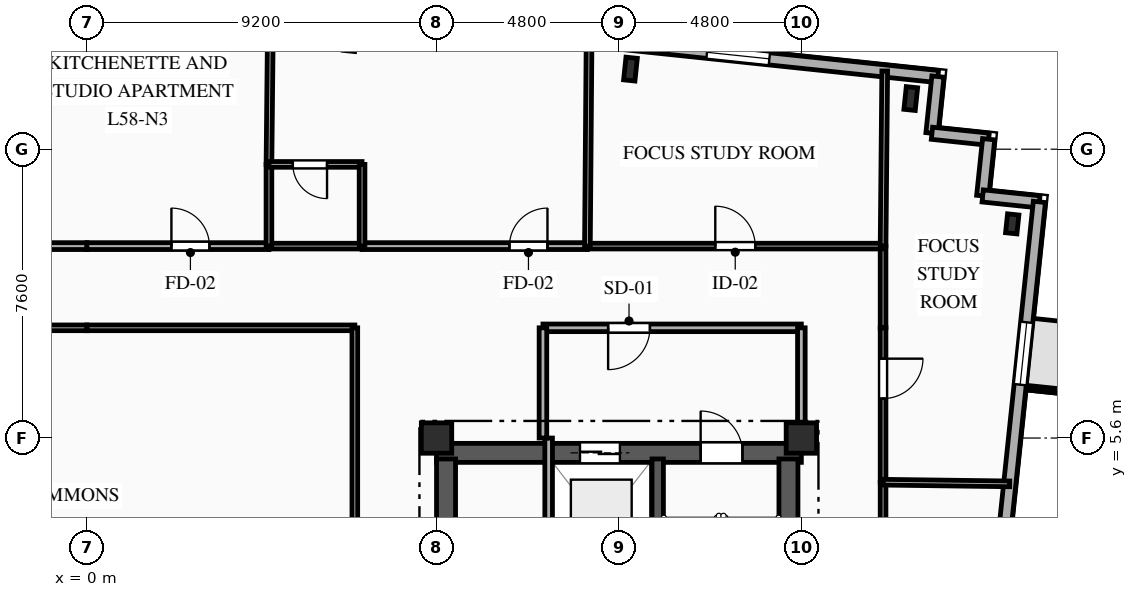
"""IFC4 building model, lengths in metres.
Left out: names, types, materials, properties, quantities, classifications, styles, units other than length and angle.
Written with IfcOpenShell. Run it as: python <this file> out.ifc"""

import sys

from ifc_helpers import new_model, si_unit, direction, frame, frame_2d, origin, origin_2d, place, context, subcontext, project, spatial, rectangle, i_section, extrude, element, fill, save


model = new_model("IFC4")
c1 = context("Model", 3, precision=1e-05, world=origin(), true_north=direction((0.0, 1.0)))
c2 = subcontext(c1, "Body", "Model", "MODEL_VIEW")
j1 = project(units=[si_unit("LENGTHUNIT", "METRE"), si_unit("PLANEANGLEUNIT", "RADIAN")], contexts=[c1])
p1 = place(None, origin())
s1 = spatial("IfcSite", under=j1, at=p1, CompositionType="ELEMENT")
p2 = place(p1, origin())
s2 = spatial("IfcBuilding", under=s1, at=p2, CompositionType="ELEMENT")
p3 = place(p2, frame((0.0, 0.0, 206.45)))
s3 = spatial("IfcBuildingStorey", under=s2, at=p3, CompositionType="ELEMENT", Elevation=206.45)
for number, where, z_axis, x_axis in (
    (1, (9.2, 5.6, 0.0), (0.0, 0.0, 1.0), (1.0, 0.0, 0.0)),
    (2, (18.8, 5.6, 0.0), (0.0, 0.0, 1.0), (1.0, 0.0, 0.0)),
):
    element("IfcColumn", number, at=place(p3, frame(where, z_axis=z_axis, x_axis=x_axis)), inside=s3, PredefinedType="COLUMN", context=c2, shape_type="SweptSolid", body=[
        extrude(rectangle(XDim=0.8, YDim=0.8, at=origin_2d()), origin(), (0.0, 0.0, 1.0), 3.35),
    ])
for number, where, z_axis, x_axis in (
    (3, (21.679, 14.532, 0.0), (0.0, 0.0, 1.0), (0.995, -0.105, 0.0)),
    (4, (14.303, 15.308, 0.0), (0.0, 0.0, 1.0), (0.995, -0.105, 0.0)),
):
    element("IfcColumn", number, at=place(p3, frame(where, z_axis=z_axis, x_axis=x_axis)), inside=s3, PredefinedType="COLUMN", context=c2, shape_type="SweptSolid", body=[
        extrude(i_section(OverallWidth=0.3, OverallDepth=0.6, WebThickness=0.015, FlangeThickness=0.03, FilletRadius=0.027, at=origin_2d()), origin(), (0.0, 0.0, 1.0), 3.35),
    ])
p4 = place(p3, frame((24.349, 11.235, 0.0), z_axis=(0.0, 0.0, 1.0), x_axis=(0.994521895368, -0.104528463268, 0.0)))
e5 = element("IfcColumn", 5, at=p4, inside=s3, PredefinedType="COLUMN", context=c2, shape_type="SweptSolid", body=[
    extrude(i_section(OverallWidth=0.3, OverallDepth=0.5, WebThickness=0.014, FlangeThickness=0.028, FilletRadius=0.027, at=origin_2d()), origin(), (0.0, 0.0, 1.0), 3.35),
])
p5 = place(p3, frame((-23.156, 19.898, 0.0), z_axis=(0.0, 0.0, 1.0), x_axis=(0.994522001802, -0.104527450613, 0.0)))
e6 = element("IfcWall", 6, at=p5, inside=s3, PredefinedType="SOLIDWALL", context=c2, shape_type="SweptSolid", body=[
    extrude(rectangle(XDim=45.8, YDim=0.32, at=frame_2d((22.9, 0.0))), origin(), (0.0, 0.0, 1.0), 3.04),
])
p6 = place(p5, frame((6.021, 0.0, 0.85)))
e7 = element("IfcOpeningElement", 7, at=p6, cuts=e6, PredefinedType="OPENING", context=c2, shape_type="SweptSolid", body=[
    extrude(rectangle(XDim=1.65, YDim=1.85, at=frame_2d((0.825, 0.925))), frame((0.0, 0.17, 0.0), z_axis=(0.0, -1.0, 0.0), x_axis=(1.0, 0.0, 0.0)), (0.0, 0.0, 1.0), 0.34),
])
p7 = place(p5, frame((15.985, 0.0, 0.85)))
e8 = element("IfcOpeningElement", 8, at=p7, cuts=e6, PredefinedType="OPENING", context=c2, shape_type="SweptSolid", body=[
    extrude(rectangle(XDim=1.5, YDim=1.85, at=frame_2d((0.75, 0.925))), frame((0.0, 0.17, 0.0), z_axis=(0.0, -1.0, 0.0), x_axis=(1.0, 0.0, 0.0)), (0.0, 0.0, 1.0), 0.34),
])
p8 = place(p5, frame((22.881, 0.0, 0.85)))
e9 = element("IfcOpeningElement", 9, at=p8, cuts=e6, PredefinedType="OPENING", context=c2, shape_type="SweptSolid", body=[
    extrude(rectangle(XDim=2.2, YDim=1.85, at=frame_2d((1.1, 0.925))), frame((0.0, 0.17, 0.0), z_axis=(0.0, -1.0, 0.0), x_axis=(1.0, 0.0, 0.0)), (0.0, 0.0, 1.0), 0.34),
])
p9 = place(p5, frame((31.288, 0.0, 0.85)))
e10 = element("IfcOpeningElement", 10, at=p9, cuts=e6, PredefinedType="OPENING", context=c2, shape_type="SweptSolid", body=[
    extrude(rectangle(XDim=2.2, YDim=1.85, at=frame_2d((1.1, 0.925))), frame((0.0, 0.17, 0.0), z_axis=(0.0, -1.0, 0.0), x_axis=(1.0, 0.0, 0.0)), (0.0, 0.0, 1.0), 0.34),
])
p10 = place(p5, frame((39.69, 0.0, 0.85)))
e11 = element("IfcOpeningElement", 11, at=p10, cuts=e6, PredefinedType="OPENING", context=c2, shape_type="SweptSolid", body=[
    extrude(rectangle(XDim=1.65, YDim=1.85, at=frame_2d((0.825, 0.925))), frame((0.0, 0.17, 0.0), z_axis=(0.0, -1.0, 0.0), x_axis=(1.0, 0.0, 0.0)), (0.0, 0.0, 1.0), 0.34),
])
p11 = place(p3, frame((22.393, 15.111, 0.0), z_axis=(0.0, 0.0, 1.0), x_axis=(-0.104481464157, -0.994526834051, 0.0)))
e12 = element("IfcWall", 12, at=p11, inside=s3, PredefinedType="SOLIDWALL", context=c2, shape_type="SweptSolid", body=[
    extrude(rectangle(XDim=1.5, YDim=0.32, at=frame_2d((0.75, 0.0))), origin(), (0.0, 0.0, 1.0), 3.04),
])
for number, where, z_axis, x_axis in (
    (13, (22.237, 13.619, 0.0), (0.0, 0.0, 1.0), (0.995, -0.104, 0.0)),
    (14, (23.728, 13.462, 0.0), (0.0, 0.0, 1.0), (-0.104, -0.995, 0.0)),
    (15, (23.572, 11.971, 0.0), (0.0, 0.0, 1.0), (0.995, -0.105, 0.0)),
):
    element("IfcWall", number, at=place(p3, frame(where, z_axis=z_axis, x_axis=x_axis)), inside=s3, PredefinedType="SOLIDWALL", context=c2, shape_type="SweptSolid", body=[
        extrude(rectangle(XDim=1.5, YDim=0.32, at=frame_2d((0.75, 0.0))), origin(), (0.0, 0.0, 1.0), 3.04),
    ])
p12 = place(p3, frame((25.063, 11.814, 0.0), z_axis=(0.0, 0.0, 1.0), x_axis=(-0.104523275986, -0.99452244056, 0.0)))
e16 = element("IfcWall", 16, at=p12, inside=s3, PredefinedType="SOLIDWALL", context=c2, shape_type="SweptSolid", body=[
    extrude(rectangle(XDim=28.8, YDim=0.32, at=frame_2d((14.4, 0.0))), origin(), (0.0, 0.0, 1.0), 3.04),
])
p13 = place(p12, frame((3.186, 0.0, 0.85)))
e17 = element("IfcOpeningElement", 17, at=p13, cuts=e16, PredefinedType="OPENING", context=c2, shape_type="SweptSolid", body=[
    extrude(rectangle(XDim=1.65, YDim=1.85, at=frame_2d((0.825, 0.925))), frame((0.0, 0.17, 0.0), z_axis=(0.0, -1.0, 0.0), x_axis=(1.0, 0.0, 0.0)), (0.0, 0.0, 1.0), 0.34),
])
p14 = place(p12, frame((11.93, 0.0, 0.85)))
e18 = element("IfcOpeningElement", 18, at=p14, cuts=e16, PredefinedType="OPENING", context=c2, shape_type="SweptSolid", body=[
    extrude(rectangle(XDim=1.65, YDim=1.85, at=frame_2d((0.825, 0.925))), frame((0.0, 0.17, 0.0), z_axis=(0.0, -1.0, 0.0), x_axis=(1.0, 0.0, 0.0)), (0.0, 0.0, 1.0), 0.34),
])
p15 = place(p12, frame((22.359, 0.0, 0.85)))
e19 = element("IfcOpeningElement", 19, at=p15, cuts=e16, PredefinedType="OPENING", context=c2, shape_type="SweptSolid", body=[
    extrude(rectangle(XDim=1.65, YDim=1.85, at=frame_2d((0.825, 0.925))), frame((0.0, 0.17, 0.0), z_axis=(0.0, -1.0, 0.0), x_axis=(1.0, 0.0, 0.0)), (0.0, 0.0, 1.0), 0.34),
])
p16 = place(p3, frame((9.2, 5.21, 0.0), z_axis=(0.0, 0.0, 1.0), x_axis=(1.0, 0.0, 0.0)))
e20 = element("IfcWall", 20, at=p16, inside=s3, PredefinedType="SHEAR", context=c2, shape_type="SweptSolid", body=[
    extrude(rectangle(XDim=9.6, YDim=0.5, at=frame_2d((4.8, 0.0))), origin(), (0.0, 0.0, 1.0), 3.04),
])
p17 = place(p16, frame((6.95, 0.0, 0.0)))
e21 = element("IfcOpeningElement", 21, at=p17, cuts=e20, PredefinedType="OPENING", context=c2, shape_type="SweptSolid", body=[
    extrude(rectangle(XDim=1.1, YDim=2.15, at=frame_2d((0.55, 1.075))), frame((0.0, 0.26, 0.0), z_axis=(0.0, -1.0, 0.0), x_axis=(1.0, 0.0, 0.0)), (0.0, 0.0, 1.0), 0.52),
])
p18 = place(p16, frame((3.775, 0.0, 0.0)))
e22 = element("IfcOpeningElement", 22, at=p18, cuts=e20, PredefinedType="OPENING", context=c2, shape_type="SweptSolid", body=[
    extrude(rectangle(XDim=1.05, YDim=2.1, at=frame_2d((0.525, 1.05))), frame((0.0, 0.26, 0.0), z_axis=(0.0, -1.0, 0.0), x_axis=(1.0, 0.0, 0.0)), (0.0, 0.0, 1.0), 0.52),
])
p19 = place(p3, frame((9.45, -5.05, 0.0), z_axis=(0.0, 0.0, 1.0), x_axis=(0.0, 1.0, 0.0)))
e23 = element("IfcWall", 23, at=p19, inside=s3, PredefinedType="SHEAR", context=c2, shape_type="SweptSolid", body=[
    extrude(rectangle(XDim=10.1, YDim=0.5, at=frame_2d((5.05, 0.0))), origin(), (0.0, 0.0, 1.0), 3.04),
])
p20 = place(p19, frame((7.15, 0.0, 0.0)))
e24 = element("IfcOpeningElement", 24, at=p20, cuts=e23, PredefinedType="OPENING", context=c2, shape_type="SweptSolid", body=[
    extrude(rectangle(XDim=0.9, YDim=2.1, at=frame_2d((0.45, 1.05))), frame((0.0, 0.26, 0.0), z_axis=(0.0, -1.0, 0.0), x_axis=(1.0, 0.0, 0.0)), (0.0, 0.0, 1.0), 0.52),
])
p21 = place(p19, frame((2.4, 0.0, 0.0)))
e25 = element("IfcOpeningElement", 25, at=p21, cuts=e23, PredefinedType="OPENING", context=c2, shape_type="SweptSolid", body=[
    extrude(rectangle(XDim=1.2, YDim=2.15, at=frame_2d((0.6, 1.075))), frame((0.0, 0.26, 0.0), z_axis=(0.0, -1.0, 0.0), x_axis=(1.0, 0.0, 0.0)), (0.0, 0.0, 1.0), 0.52),
])
p22 = place(p3, frame((18.46, -5.05, 0.0), z_axis=(0.0, 0.0, 1.0), x_axis=(0.0, 1.0, 0.0)))
e26 = element("IfcWall", 26, at=p22, inside=s3, PredefinedType="SHEAR", context=c2, shape_type="SweptSolid", body=[
    extrude(rectangle(XDim=10.1, YDim=0.5, at=frame_2d((5.05, 0.0))), origin(), (0.0, 0.0, 1.0), 3.04),
])
p23 = place(p3, frame((15.02, -5.05, 0.0), z_axis=(0.0, 0.0, 1.0), x_axis=(0.0, 1.0, 0.0)))
e27 = element("IfcWall", 27, at=p23, inside=s3, PredefinedType="SHEAR", context=c2, shape_type="SweptSolid", body=[
    extrude(rectangle(XDim=10.1, YDim=0.3, at=frame_2d((5.05, 0.0))), origin(), (0.0, 0.0, 1.0), 3.04),
])
p24 = place(p3, frame((12.15, 5.6, 0.0), z_axis=(0.0, 0.0, 1.0), x_axis=(0.0, -1.0, 0.0)))
e28 = element("IfcWall", 28, at=p24, inside=s3, PredefinedType="PARTITIONING", context=c2, shape_type="SweptSolid", body=[
    extrude(rectangle(XDim=4.05, YDim=0.2, at=frame_2d((2.025, 0.0))), origin(), (0.0, 0.0, 1.0), 3.04),
])
p25 = place(p3, frame((18.8, 8.5, 0.0), z_axis=(0.0, 0.0, 1.0), x_axis=(-1.0, 0.0, 0.0)))
e29 = element("IfcWall", 29, at=p25, inside=s3, PredefinedType="PARTITIONING", context=c2, shape_type="SweptSolid", body=[
    extrude(rectangle(XDim=6.8, YDim=0.2, at=frame_2d((3.4, 0.0))), origin(), (0.0, 0.0, 1.0), 3.04),
])
p26 = place(p25, frame((3.985, 0.0, 0.0)))
e30 = element("IfcOpeningElement", 30, at=p26, cuts=e29, PredefinedType="OPENING", context=c2, shape_type="SweptSolid", body=[
    extrude(rectangle(XDim=1.1, YDim=2.15, at=frame_2d((0.55, 1.075))), frame((0.0, 0.11, 0.0), z_axis=(0.0, -1.0, 0.0), x_axis=(1.0, 0.0, 0.0)), (0.0, 0.0, 1.0), 0.22),
])
p27 = place(p3, frame((18.8, 5.6, 0.0), z_axis=(0.0, 0.0, 1.0), x_axis=(0.0, 1.0, 0.0)))
e31 = element("IfcWall", 31, at=p27, inside=s3, PredefinedType="PARTITIONING", context=c2, shape_type="SweptSolid", body=[
    extrude(rectangle(XDim=2.9, YDim=0.2, at=frame_2d((1.45, 0.0))), origin(), (0.0, 0.0, 1.0), 2.665),
])
p28 = place(p3, frame((12.0, 8.5, 0.0), z_axis=(0.0, 0.0, 1.0), x_axis=(0.0, -1.0, 0.0)))
e32 = element("IfcWall", 32, at=p28, inside=s3, PredefinedType="PARTITIONING", context=c2, shape_type="SweptSolid", body=[
    extrude(rectangle(XDim=2.9, YDim=0.2, at=frame_2d((1.45, 0.0))), origin(), (0.0, 0.0, 1.0), 3.04),
])
p29 = place(p3, frame((-1.14, 10.65, 0.0), z_axis=(0.0, 0.0, 1.0), x_axis=(1.0, 0.0, 0.0)))
e33 = element("IfcWall", 33, at=p29, inside=s3, PredefinedType="PARTITIONING", context=c2, shape_type="SweptSolid", body=[
    extrude(rectangle(XDim=1.14, YDim=0.18, at=frame_2d((0.57, 0.0))), origin(), (0.0, 0.0, 1.0), 3.04),
])
p30 = place(p3, frame((0.0, 8.5, 0.0), z_axis=(0.0, 0.0, 1.0), x_axis=(-1.0, 0.0, 0.0)))
e34 = element("IfcWall", 34, at=p30, inside=s3, PredefinedType="PARTITIONING", context=c2, shape_type="SweptSolid", body=[
    extrude(rectangle(XDim=7.05, YDim=0.15, at=frame_2d((3.525, 0.0))), origin(), (0.0, 0.0, 1.0), 3.04),
])
p31 = place(p3, frame((20.95, 10.65, 0.0), z_axis=(0.0, 0.0, 1.0), x_axis=(0.0, -1.0, 0.0)))
e35 = element("IfcWall", 35, at=p31, inside=s3, PredefinedType="PARTITIONING", context=c2, shape_type="SweptSolid", body=[
    extrude(rectangle(XDim=2.15, YDim=0.15, at=frame_2d((1.075, 0.0))), origin(), (0.0, 0.0, 1.0), 3.04),
])
p32 = place(p3, frame((0.0, 10.65, 0.0), z_axis=(0.0, 0.0, 1.0), x_axis=(1.0, 0.0, 0.0)))
e36 = element("IfcWall", 36, at=p32, inside=s3, PredefinedType="PARTITIONING", context=c2, shape_type="SweptSolid", body=[
    extrude(rectangle(XDim=4.79, YDim=0.18, at=frame_2d((2.395, 0.0))), origin(), (0.0, 0.0, 1.0), 3.04),
])
p33 = place(p32, frame((2.224, 0.0, 0.0)))
e37 = element("IfcOpeningElement", 37, at=p33, cuts=e36, PredefinedType="OPENING", context=c2, shape_type="SweptSolid", body=[
    extrude(rectangle(XDim=1.0, YDim=2.15, at=frame_2d((0.5, 1.075))), frame((0.0, 0.1, 0.0), z_axis=(0.0, -1.0, 0.0), x_axis=(1.0, 0.0, 0.0)), (0.0, 0.0, 1.0), 0.2),
])
p34 = place(p3, frame((7.24, 10.65, 0.0), z_axis=(0.0, 0.0, 1.0), x_axis=(1.0, 0.0, 0.0)))
e38 = element("IfcWall", 38, at=p34, inside=s3, PredefinedType="PARTITIONING", context=c2, shape_type="SweptSolid", body=[
    extrude(rectangle(XDim=5.93, YDim=0.18, at=frame_2d((2.965, 0.0))), origin(), (0.0, 0.0, 1.0), 3.04),
])
p35 = place(p34, frame((3.879, 0.0, 0.0)))
e39 = element("IfcOpeningElement", 39, at=p35, cuts=e38, PredefinedType="OPENING", context=c2, shape_type="SweptSolid", body=[
    extrude(rectangle(XDim=1.0, YDim=2.15, at=frame_2d((0.5, 1.075))), frame((0.0, 0.1, 0.0), z_axis=(0.0, -1.0, 0.0), x_axis=(1.0, 0.0, 0.0)), (0.0, 0.0, 1.0), 0.2),
])
p36 = place(p3, frame((4.79, 10.65, 0.0), z_axis=(0.0, 0.0, 1.0), x_axis=(1.0, 0.0, 0.0)))
e40 = element("IfcWall", 40, at=p36, inside=s3, PredefinedType="PLUMBINGWALL", context=c2, shape_type="SweptSolid", body=[
    extrude(rectangle(XDim=2.45, YDim=0.15, at=frame_2d((1.225, 0.0))), origin(), (0.0, 0.0, 1.0), 3.04),
])
p37 = place(p3, frame((13.17, 10.65, 0.0), z_axis=(0.0, 0.0, 1.0), x_axis=(1.0, 0.0, 0.0)))
e41 = element("IfcWall", 41, at=p37, inside=s3, PredefinedType="PARTITIONING", context=c2, shape_type="SweptSolid", body=[
    extrude(rectangle(XDim=7.78, YDim=0.15, at=frame_2d((3.89, 0.0))), origin(), (0.0, 0.0, 1.0), 3.04),
])
p38 = place(p37, frame((3.365, 0.0, 0.0)))
e42 = element("IfcOpeningElement", 42, at=p38, cuts=e41, PredefinedType="OPENING", context=c2, shape_type="SweptSolid", body=[
    extrude(rectangle(XDim=1.05, YDim=2.15, at=frame_2d((0.525, 1.075))), frame((0.0, 0.085, 0.0), z_axis=(0.0, -1.0, 0.0), x_axis=(1.0, 0.0, 0.0)), (0.0, 0.0, 1.0), 0.17),
])
p39 = place(p3, frame((7.05, 8.5, 0.0), z_axis=(0.0, 0.0, 1.0), x_axis=(-1.0, 0.0, 0.0)))
e43 = element("IfcWall", 43, at=p39, inside=s3, PredefinedType="PARTITIONING", context=c2, shape_type="SweptSolid", body=[
    extrude(rectangle(XDim=7.05, YDim=0.15, at=frame_2d((3.525, 0.0))), origin(), (0.0, 0.0, 1.0), 3.04),
])
p40 = place(p3, frame((20.95, 4.438, 0.0), z_axis=(0.0, 0.0, 1.0), x_axis=(0.0, -1.0, 0.0)))
e44 = element("IfcWall", 44, at=p40, inside=s3, PredefinedType="PARTITIONING", context=c2, shape_type="SweptSolid", body=[
    extrude(rectangle(XDim=10.038, YDim=0.15, at=frame_2d((5.019, 0.0))), origin(), (0.0, 0.0, 1.0), 2.695),
])
p41 = place(p40, frame((5.472, 0.0, 0.0)))
e45 = element("IfcOpeningElement", 45, at=p41, cuts=e44, PredefinedType="OPENING", context=c2, shape_type="SweptSolid", body=[
    extrude(rectangle(XDim=1.05, YDim=2.15, at=frame_2d((0.525, 1.075))), frame((0.0, 0.085, 0.0), z_axis=(0.0, -1.0, 0.0), x_axis=(1.0, 0.0, 0.0)), (0.0, 0.0, 1.0), 0.17),
])
p42 = place(p3, frame((20.95, 8.5, 0.0), z_axis=(0.0, 0.0, 1.0), x_axis=(0.0, -1.0, 0.0)))
e46 = element("IfcWall", 46, at=p42, inside=s3, PredefinedType="PARTITIONING", context=c2, shape_type="SweptSolid", body=[
    extrude(rectangle(XDim=4.062, YDim=0.15, at=frame_2d((2.031, 0.0))), origin(), (0.0, 0.0, 1.0), 3.04),
])
p43 = place(p42, frame((0.812, 0.0, 0.0)))
e47 = element("IfcOpeningElement", 47, at=p43, cuts=e46, PredefinedType="OPENING", context=c2, shape_type="SweptSolid", body=[
    extrude(rectangle(XDim=1.05, YDim=2.15, at=frame_2d((0.525, 1.075))), frame((0.0, 0.085, 0.0), z_axis=(0.0, -1.0, 0.0), x_axis=(1.0, 0.0, 0.0)), (0.0, 0.0, 1.0), 0.17),
])
p44 = place(p3, frame((7.05, -0.8, 0.0), z_axis=(0.0, 0.0, 1.0), x_axis=(0.0, 1.0, 0.0)))
e48 = element("IfcWall", 48, at=p44, inside=s3, PredefinedType="PARTITIONING", context=c2, shape_type="SweptSolid", body=[
    extrude(rectangle(XDim=9.3, YDim=0.15, at=frame_2d((4.65, 0.0))), origin(), (0.0, 0.0, 1.0), 3.04),
])
p45 = place(p3, frame((20.95, 4.438, 0.0), z_axis=(0.0, 0.0, 1.0), x_axis=(0.999913116238, -0.013181804667, 0.0)))
e49 = element("IfcWall", 49, at=p45, inside=s3, PredefinedType="PARTITIONING", context=c2, shape_type="SweptSolid", body=[
    extrude(rectangle(XDim=3.334, YDim=0.15, at=frame_2d((1.667, 0.0))), origin(), (0.0, 0.0, 1.0), 3.04),
])
p46 = place(p3, frame((20.95, 10.65, 0.0), z_axis=(0.0, 0.0, 1.0), x_axis=(0.009535990233, 0.999954531411, 0.0)))
e50 = element("IfcWall", 50, at=p46, inside=s3, PredefinedType="PARTITIONING", context=c2, shape_type="SweptSolid", body=[
    extrude(rectangle(XDim=4.608, YDim=0.15, at=frame_2d((2.304, 0.0))), origin(), (0.0, 0.0, 1.0), 2.665),
])
p47 = place(p3, frame((4.834, 16.957, 0.0), z_axis=(0.0, 0.0, 1.0), x_axis=(-0.010572096358, -0.999944113828, 0.0)))
e51 = element("IfcWall", 51, at=p47, inside=s3, PredefinedType="PARTITIONING", context=c2, shape_type="SweptSolid", body=[
    extrude(rectangle(XDim=4.157, YDim=0.15, at=frame_2d((2.078, 0.0))), origin(), (0.0, 0.0, 1.0), 3.04),
])
p48 = place(p3, frame((4.79, 12.8, 0.0), z_axis=(0.0, 0.0, 1.0), x_axis=(0.0, -1.0, 0.0)))
e52 = element("IfcWall", 52, at=p48, inside=s3, PredefinedType="PLUMBINGWALL", context=c2, shape_type="SweptSolid", body=[
    extrude(rectangle(XDim=2.15, YDim=0.15, at=frame_2d((1.075, 0.0))), origin(), (0.0, 0.0, 1.0), 3.04),
])
p49 = place(p3, frame((7.24, 12.8, 0.0), z_axis=(0.0, 0.0, 1.0), x_axis=(-1.0, 0.0, 0.0)))
e53 = element("IfcWall", 53, at=p49, inside=s3, PredefinedType="PLUMBINGWALL", context=c2, shape_type="SweptSolid", body=[
    extrude(rectangle(XDim=2.45, YDim=0.15, at=frame_2d((1.225, 0.0))), origin(), (0.0, 0.0, 1.0), 3.04),
])
p50 = place(p49, frame((0.921, 0.0, 0.0)))
e54 = element("IfcOpeningElement", 54, at=p50, cuts=e53, PredefinedType="OPENING", context=c2, shape_type="SweptSolid", body=[
    extrude(rectangle(XDim=0.9, YDim=2.1, at=frame_2d((0.45, 1.05))), frame((0.0, 0.085, 0.0), z_axis=(0.0, -1.0, 0.0), x_axis=(1.0, 0.0, 0.0)), (0.0, 0.0, 1.0), 0.17),
])
p51 = place(p3, frame((7.24, 10.65, 0.0), z_axis=(0.0, 0.0, 1.0), x_axis=(0.0, 1.0, 0.0)))
e55 = element("IfcWall", 55, at=p51, inside=s3, PredefinedType="PLUMBINGWALL", context=c2, shape_type="SweptSolid", body=[
    extrude(rectangle(XDim=2.15, YDim=0.15, at=frame_2d((1.075, 0.0))), origin(), (0.0, 0.0, 1.0), 3.04),
])
p52 = place(p3, frame((13.214, 16.076, 0.0), z_axis=(0.0, 0.0, 1.0), x_axis=(-0.008099086408, -0.999967201862, 0.0)))
e56 = element("IfcWall", 56, at=p52, inside=s3, PredefinedType="PARTITIONING", context=c2, shape_type="SweptSolid", body=[
    extrude(rectangle(XDim=5.426, YDim=0.15, at=frame_2d((2.713, 0.0))), origin(), (0.0, 0.0, 1.0), 3.04),
])
p53 = place(p10, origin())
e57 = element("IfcWindow", 57, at=p53, inside=s3, PartitioningType="SINGLE_PANEL", PredefinedType="WINDOW", context=c2, shape_type="SweptSolid", body=[
    extrude(rectangle(XDim=1.65, YDim=1.85, at=frame_2d((0.825, 0.925))), frame((0.0, 0.03, 0.0), z_axis=(0.0, -1.0, 0.0), x_axis=(1.0, 0.0, 0.0)), (0.0, 0.0, 1.0), 0.06),
])
fill(e11, e57)
p54 = place(p13, origin())
e58 = element("IfcWindow", 58, at=p54, inside=s3, PartitioningType="SINGLE_PANEL", PredefinedType="WINDOW", context=c2, shape_type="SweptSolid", body=[
    extrude(rectangle(XDim=1.65, YDim=1.85, at=frame_2d((0.825, 0.925))), frame((0.0, 0.03, 0.0), z_axis=(0.0, -1.0, 0.0), x_axis=(1.0, 0.0, 0.0)), (0.0, 0.0, 1.0), 0.06),
])
fill(e17, e58)
p55 = place(p17, origin())
e59 = element("IfcDoor", 59, at=p55, inside=s3, OperationType="SINGLE_SWING_LEFT", PredefinedType="DOOR", context=c2, shape_type="SweptSolid", body=[
    extrude(rectangle(XDim=1.1, YDim=2.15, at=frame_2d((0.55, 1.075))), frame((0.0, 0.025, 0.0), z_axis=(0.0, -1.0, 0.0), x_axis=(1.0, 0.0, 0.0)), (0.0, 0.0, 1.0), 0.05),
])
fill(e21, e59)
p56 = place(p18, origin())
e60 = element("IfcDoor", 60, at=p56, inside=s3, OperationType="DOUBLE_DOOR_SLIDING", PredefinedType="DOOR", context=c2, shape_type="SweptSolid", body=[
    extrude(rectangle(XDim=1.05, YDim=2.1, at=frame_2d((0.525, 1.05))), frame((0.0, 0.025, 0.0), z_axis=(0.0, -1.0, 0.0), x_axis=(1.0, 0.0, 0.0)), (0.0, 0.0, 1.0), 0.05),
])
fill(e22, e60)
p57 = place(p26, origin())
e61 = element("IfcDoor", 61, at=p57, inside=s3, OperationType="SINGLE_SWING_RIGHT", PredefinedType="DOOR", context=c2, shape_type="SweptSolid", body=[
    extrude(rectangle(XDim=1.1, YDim=2.15, at=frame_2d((0.55, 1.075))), frame((0.0, 0.025, 0.0), z_axis=(0.0, -1.0, 0.0), x_axis=(1.0, 0.0, 0.0)), (0.0, 0.0, 1.0), 0.05),
])
fill(e30, e61)
p58 = place(p33, origin())
e62 = element("IfcDoor", 62, at=p58, inside=s3, OperationType="SINGLE_SWING_LEFT", PredefinedType="DOOR", context=c2, shape_type="SweptSolid", body=[
    extrude(rectangle(XDim=1.0, YDim=2.15, at=frame_2d((0.5, 1.075))), frame((0.0, 0.025, 0.0), z_axis=(0.0, -1.0, 0.0), x_axis=(1.0, 0.0, 0.0)), (0.0, 0.0, 1.0), 0.05),
])
fill(e37, e62)
p59 = place(p35, origin())
e63 = element("IfcDoor", 63, at=p59, inside=s3, OperationType="SINGLE_SWING_RIGHT", PredefinedType="DOOR", context=c2, shape_type="SweptSolid", body=[
    extrude(rectangle(XDim=1.0, YDim=2.15, at=frame_2d((0.5, 1.075))), frame((0.0, 0.025, 0.0), z_axis=(0.0, -1.0, 0.0), x_axis=(1.0, 0.0, 0.0)), (0.0, 0.0, 1.0), 0.05),
])
fill(e39, e63)
p60 = place(p38, origin())
e64 = element("IfcDoor", 64, at=p60, inside=s3, OperationType="SINGLE_SWING_LEFT", PredefinedType="DOOR", context=c2, shape_type="SweptSolid", body=[
    extrude(rectangle(XDim=1.05, YDim=2.15, at=frame_2d((0.525, 1.075))), frame((0.0, 0.025, 0.0), z_axis=(0.0, -1.0, 0.0), x_axis=(1.0, 0.0, 0.0)), (0.0, 0.0, 1.0), 0.05),
])
fill(e42, e64)
p61 = place(p43, origin())
e65 = element("IfcDoor", 65, at=p61, inside=s3, OperationType="SINGLE_SWING_LEFT", PredefinedType="DOOR", context=c2, shape_type="SweptSolid", body=[
    extrude(rectangle(XDim=1.05, YDim=2.15, at=frame_2d((0.525, 1.075))), frame((0.0, 0.025, 0.0), z_axis=(0.0, -1.0, 0.0), x_axis=(1.0, 0.0, 0.0)), (0.0, 0.0, 1.0), 0.05),
])
fill(e47, e65)
p62 = place(p50, origin())
e66 = element("IfcDoor", 66, at=p62, inside=s3, OperationType="SINGLE_SWING_LEFT", PredefinedType="DOOR", context=c2, shape_type="SweptSolid", body=[
    extrude(rectangle(XDim=0.9, YDim=2.1, at=frame_2d((0.45, 1.05))), frame((0.0, 0.025, 0.0), z_axis=(0.0, -1.0, 0.0), x_axis=(1.0, 0.0, 0.0)), (0.0, 0.0, 1.0), 0.05),
])
fill(e54, e66)
save(model, sys.argv[1])
